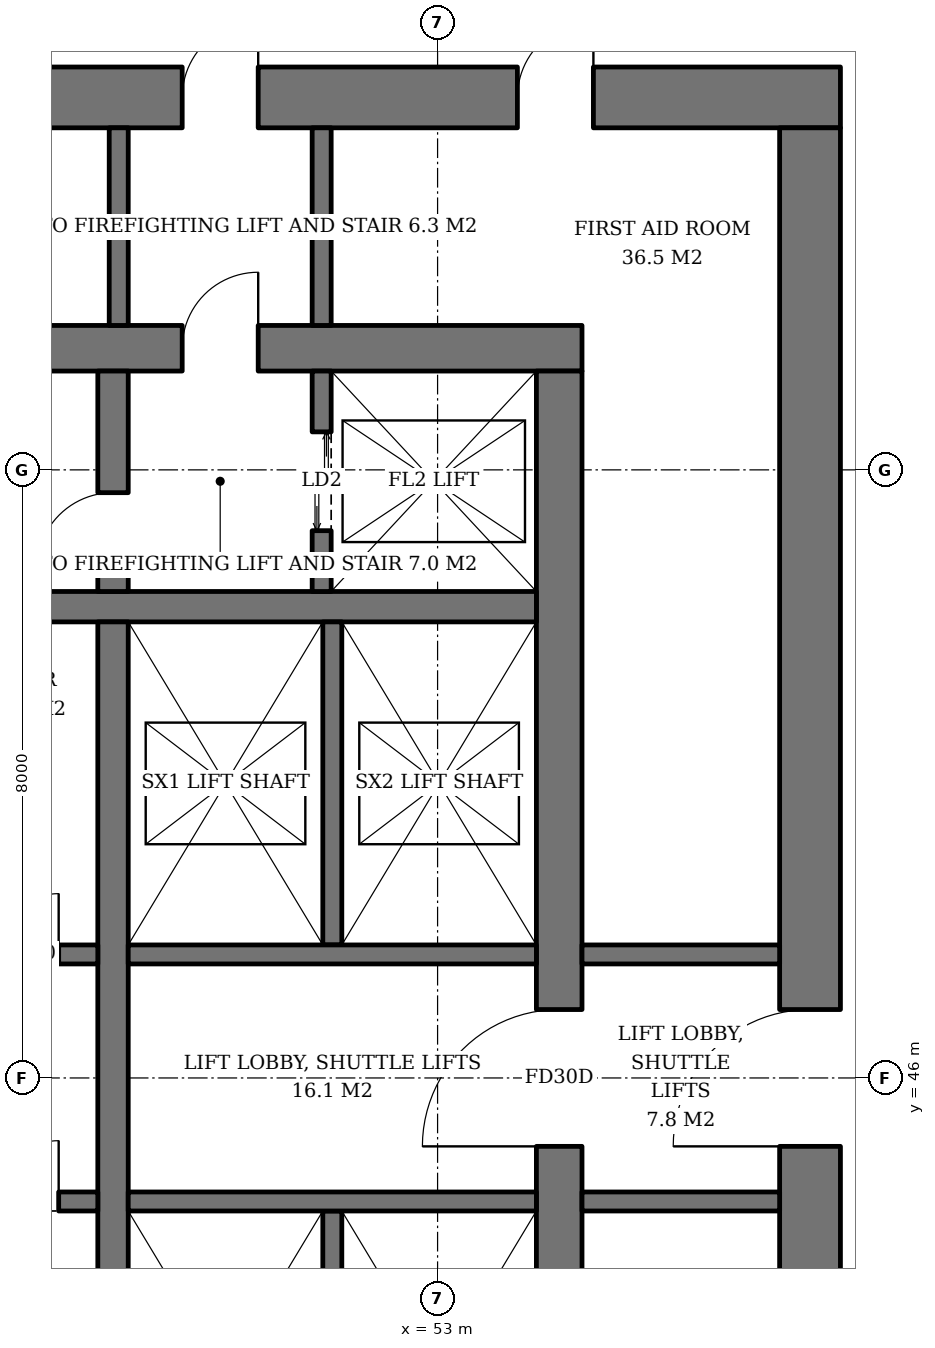
"""IFC4 building model, lengths in metres.
Left out: names, types, materials, properties, quantities, classifications, styles, units other than length and angle.
Written with IfcOpenShell. Run it as: python <this file> out.ifc"""

import sys

from ifc_helpers import new_model, si_unit, direction, frame, frame_2d, origin, place, context, subcontext, project, spatial, rectangle, extrude, element, fill, save


model = new_model("IFC4")
c1 = context("Model", 3, precision=1e-05, world=origin(), true_north=direction((0.0, 1.0)))
c2 = subcontext(c1, "Body", "Model", "MODEL_VIEW")
j1 = project(units=[si_unit("LENGTHUNIT", "METRE"), si_unit("PLANEANGLEUNIT", "RADIAN")], contexts=[c1])
p1 = place(None, origin())
s1 = spatial("IfcSite", under=j1, at=p1, CompositionType="ELEMENT")
p2 = place(p1, origin())
s2 = spatial("IfcBuilding", under=s1, at=p2, CompositionType="ELEMENT")
p3 = place(p2, frame((0.0, 0.0, 70.4)))
s3 = spatial("IfcBuildingStorey", under=s2, at=p3, CompositionType="ELEMENT", Elevation=70.4)
p4 = place(p3, frame((35.1, 55.6, 0.0), z_axis=(0.0, 0.0, 1.0), x_axis=(1.0, 0.0, 0.0)))
e1 = element("IfcWall", 1, at=p4, inside=s3, PredefinedType="SHEAR", context=c2, shape_type="SweptSolid", body=[
    extrude(rectangle(XDim=19.8, YDim=0.6, at=frame_2d((9.9, 0.0))), origin(), (0.0, 0.0, 1.0), 3.8),
])
p5 = place(p4, frame((14.54, 0.0, 0.0)))
e2 = element("IfcOpeningElement", 2, at=p5, cuts=e1, PredefinedType="OPENING", context=c2, shape_type="SweptSolid", body=[
    extrude(rectangle(XDim=1.0, YDim=2.1, at=frame_2d((0.5, 1.05))), frame((0.0, 0.31, 0.0), z_axis=(0.0, -1.0, 0.0), x_axis=(1.0, 0.0, 0.0)), (0.0, 0.0, 1.0), 0.62),
])
p6 = place(p4, frame((2.425, 0.0, 0.0)))
e3 = element("IfcOpeningElement", 3, at=p6, cuts=e1, PredefinedType="OPENING", context=c2, shape_type="SweptSolid", body=[
    extrude(rectangle(XDim=1.0, YDim=2.1, at=frame_2d((0.5, 1.05))), frame((0.0, 0.31, 0.0), z_axis=(0.0, -1.0, 0.0), x_axis=(1.0, 0.0, 0.0)), (0.0, 0.0, 1.0), 0.62),
])
p7 = place(p3, frame((54.6, 36.7, 0.0), z_axis=(0.0, 0.0, 1.0), x_axis=(0.0, 1.0, 0.0)))
e4 = element("IfcWall", 4, at=p7, inside=s3, PredefinedType="SHEAR", context=c2, shape_type="SweptSolid", body=[
    extrude(rectangle(XDim=18.6, YDim=0.6, at=frame_2d((9.3, 0.0))), origin(), (0.0, 0.0, 1.0), 3.8),
])
p8 = place(p7, frame((8.4, 0.0, 0.0)))
e5 = element("IfcOpeningElement", 5, at=p8, cuts=e4, PredefinedType="OPENING", context=c2, shape_type="SweptSolid", body=[
    extrude(rectangle(XDim=1.8, YDim=2.4, at=frame_2d((0.9, 1.2))), frame((0.0, 0.31, 0.0), z_axis=(0.0, -1.0, 0.0), x_axis=(1.0, 0.0, 0.0)), (0.0, 0.0, 1.0), 0.62),
])
p9 = place(p3, frame((31.7, 58.9, 0.0), z_axis=(0.0, 0.0, 1.0), x_axis=(1.0, 0.0, 0.0)))
e6 = element("IfcWall", 6, at=p9, inside=s3, PredefinedType="SHEAR", context=c2, shape_type="SweptSolid", body=[
    extrude(rectangle(XDim=26.6, YDim=0.8, at=frame_2d((13.3, 0.0))), origin(), (0.0, 0.0, 1.0), 3.8),
])
p10 = place(p9, frame((17.94, 0.0, 0.0)))
e7 = element("IfcOpeningElement", 7, at=p10, cuts=e6, PredefinedType="OPENING", context=c2, shape_type="SweptSolid", body=[
    extrude(rectangle(XDim=1.0, YDim=2.1, at=frame_2d((0.5, 1.05))), frame((0.0, 0.41, 0.0), z_axis=(0.0, -1.0, 0.0), x_axis=(1.0, 0.0, 0.0)), (0.0, 0.0, 1.0), 0.82),
])
p11 = place(p9, frame((5.825, 0.0, 0.0)))
e8 = element("IfcOpeningElement", 8, at=p11, cuts=e6, PredefinedType="OPENING", context=c2, shape_type="SweptSolid", body=[
    extrude(rectangle(XDim=1.0, YDim=2.1, at=frame_2d((0.5, 1.05))), frame((0.0, 0.41, 0.0), z_axis=(0.0, -1.0, 0.0), x_axis=(1.0, 0.0, 0.0)), (0.0, 0.0, 1.0), 0.82),
])
p12 = place(p9, frame((1.139, 0.0, 0.0)))
e9 = element("IfcOpeningElement", 9, at=p12, cuts=e6, PredefinedType="OPENING", context=c2, shape_type="SweptSolid", body=[
    extrude(rectangle(XDim=1.0, YDim=2.1, at=frame_2d((0.5, 1.05))), frame((0.0, 0.41, 0.0), z_axis=(0.0, -1.0, 0.0), x_axis=(1.0, 0.0, 0.0)), (0.0, 0.0, 1.0), 0.82),
])
p13 = place(p9, frame((2.661, 0.0, 0.0)))
e10 = element("IfcOpeningElement", 10, at=p13, cuts=e6, PredefinedType="OPENING", context=c2, shape_type="SweptSolid", body=[
    extrude(rectangle(XDim=1.0, YDim=2.1, at=frame_2d((0.5, 1.05))), frame((0.0, 0.41, 0.0), z_axis=(0.0, -1.0, 0.0), x_axis=(1.0, 0.0, 0.0)), (0.0, 0.0, 1.0), 0.82),
])
p14 = place(p9, frame((4.204, 0.0, 0.0)))
e11 = element("IfcOpeningElement", 11, at=p14, cuts=e6, PredefinedType="OPENING", context=c2, shape_type="SweptSolid", body=[
    extrude(rectangle(XDim=1.0, YDim=2.1, at=frame_2d((0.5, 1.05))), frame((0.0, 0.41, 0.0), z_axis=(0.0, -1.0, 0.0), x_axis=(1.0, 0.0, 0.0)), (0.0, 0.0, 1.0), 0.82),
])
p15 = place(p9, frame((8.44, 0.0, 0.0)))
e12 = element("IfcOpeningElement", 12, at=p15, cuts=e6, PredefinedType="OPENING", context=c2, shape_type="SweptSolid", body=[
    extrude(rectangle(XDim=1.0, YDim=2.1, at=frame_2d((0.5, 1.05))), frame((0.0, 0.41, 0.0), z_axis=(0.0, -1.0, 0.0), x_axis=(1.0, 0.0, 0.0)), (0.0, 0.0, 1.0), 0.82),
])
p16 = place(p9, frame((13.342, 0.0, 0.0)))
e13 = element("IfcOpeningElement", 13, at=p16, cuts=e6, PredefinedType="OPENING", context=c2, shape_type="SweptSolid", body=[
    extrude(rectangle(XDim=1.0, YDim=2.1, at=frame_2d((0.5, 1.05))), frame((0.0, 0.41, 0.0), z_axis=(0.0, -1.0, 0.0), x_axis=(1.0, 0.0, 0.0)), (0.0, 0.0, 1.0), 0.82),
])
p17 = place(p9, frame((22.35, 0.0, 0.0)))
e14 = element("IfcOpeningElement", 14, at=p17, cuts=e6, PredefinedType="OPENING", context=c2, shape_type="SweptSolid", body=[
    extrude(rectangle(XDim=1.0, YDim=2.1, at=frame_2d((0.5, 1.05))), frame((0.0, 0.41, 0.0), z_axis=(0.0, -1.0, 0.0), x_axis=(1.0, 0.0, 0.0)), (0.0, 0.0, 1.0), 0.82),
])
p18 = place(p3, frame((57.9, 33.5, 0.0), z_axis=(0.0, 0.0, 1.0), x_axis=(0.0, 1.0, 0.0)))
e15 = element("IfcWall", 15, at=p18, inside=s3, PredefinedType="SHEAR", context=c2, shape_type="SweptSolid", body=[
    extrude(rectangle(XDim=25.0, YDim=0.8, at=frame_2d((12.5, 0.0))), origin(), (0.0, 0.0, 1.0), 3.8),
])
p19 = place(p18, frame((11.6, 0.0, 0.0)))
e16 = element("IfcOpeningElement", 16, at=p19, cuts=e15, PredefinedType="OPENING", context=c2, shape_type="SweptSolid", body=[
    extrude(rectangle(XDim=1.8, YDim=2.4, at=frame_2d((0.9, 1.2))), frame((0.0, 0.41, 0.0), z_axis=(0.0, -1.0, 0.0), x_axis=(1.0, 0.0, 0.0)), (0.0, 0.0, 1.0), 0.82),
])
p20 = place(p3, frame((35.7, 52.2, 0.0), z_axis=(0.0, 0.0, 1.0), x_axis=(1.0, 0.0, 0.0)))
e17 = element("IfcWall", 17, at=p20, inside=s3, PredefinedType="SHEAR", context=c2, shape_type="SweptSolid", body=[
    extrude(rectangle(XDim=18.6, YDim=0.4, at=frame_2d((9.3, 0.0))), origin(), (0.0, 0.0, 1.0), 3.8),
])
p21 = place(p3, frame((48.73, 40.0, 0.0), z_axis=(0.0, 0.0, 1.0), x_axis=(0.0, 1.0, 0.0)))
e18 = element("IfcWall", 18, at=p21, inside=s3, PredefinedType="SHEAR", context=c2, shape_type="SweptSolid", body=[
    extrude(rectangle(XDim=12.0, YDim=0.4, at=frame_2d((6.0, 0.0))), origin(), (0.0, 0.0, 1.0), 3.8),
])
p22 = place(p3, frame((48.73, 52.4, 0.0), z_axis=(0.0, 0.0, 1.0), x_axis=(0.0, 1.0, 0.0)))
e19 = element("IfcWall", 19, at=p22, inside=s3, PredefinedType="SHEAR", context=c2, shape_type="SweptSolid", body=[
    extrude(rectangle(XDim=2.9, YDim=0.4, at=frame_2d((1.45, 0.0))), origin(), (0.0, 0.0, 1.0), 3.8),
])
p23 = place(p22, frame((0.3, 0.0, 0.0)))
e20 = element("IfcOpeningElement", 20, at=p23, cuts=e19, PredefinedType="OPENING", context=c2, shape_type="SweptSolid", body=[
    extrude(rectangle(XDim=1.0, YDim=2.1, at=frame_2d((0.5, 1.05))), frame((0.0, 0.21, 0.0), z_axis=(0.0, -1.0, 0.0), x_axis=(1.0, 0.0, 0.0)), (0.0, 0.0, 1.0), 0.42),
])
p24 = place(p3, frame((51.475, 52.4, 0.0), z_axis=(0.0, 0.0, 1.0), x_axis=(0.0, 1.0, 0.0)))
e21 = element("IfcWall", 21, at=p24, inside=s3, PredefinedType="SHEAR", context=c2, shape_type="SweptSolid", body=[
    extrude(rectangle(XDim=2.9, YDim=0.25, at=frame_2d((1.45, 0.0))), origin(), (0.0, 0.0, 1.0), 3.8),
])
p25 = place(p24, frame((0.8, 0.0, 0.0)))
e22 = element("IfcOpeningElement", 22, at=p25, cuts=e21, PredefinedType="OPENING", context=c2, shape_type="SweptSolid", body=[
    extrude(rectangle(XDim=1.3, YDim=2.2, at=frame_2d((0.65, 1.1))), frame((0.0, 0.135, 0.0), z_axis=(0.0, -1.0, 0.0), x_axis=(1.0, 0.0, 0.0)), (0.0, 0.0, 1.0), 0.27),
])
p26 = place(p3, frame((35.7, 47.625, 0.0), z_axis=(0.0, 0.0, 1.0), x_axis=(1.0, 0.0, 0.0)))
e23 = element("IfcWall", 23, at=p26, inside=s3, PredefinedType="SHEAR", context=c2, shape_type="SweptSolid", body=[
    extrude(rectangle(XDim=12.83, YDim=0.25, at=frame_2d((6.415, 0.0))), origin(), (0.0, 0.0, 1.0), 3.8),
])
p27 = place(p26, frame((0.7, 0.0, 0.0)))
e24 = element("IfcOpeningElement", 24, at=p27, cuts=e23, PredefinedType="OPENING", context=c2, shape_type="SweptSolid", body=[
    extrude(rectangle(XDim=1.1, YDim=2.2, at=frame_2d((0.55, 1.1))), frame((0.0, 0.135, 0.0), z_axis=(0.0, -1.0, 0.0), x_axis=(1.0, 0.0, 0.0)), (0.0, 0.0, 1.0), 0.27),
])
p28 = place(p26, frame((3.45, 0.0, 0.0)))
e25 = element("IfcOpeningElement", 25, at=p28, cuts=e23, PredefinedType="OPENING", context=c2, shape_type="SweptSolid", body=[
    extrude(rectangle(XDim=1.1, YDim=2.2, at=frame_2d((0.55, 1.1))), frame((0.0, 0.135, 0.0), z_axis=(0.0, -1.0, 0.0), x_axis=(1.0, 0.0, 0.0)), (0.0, 0.0, 1.0), 0.27),
])
p29 = place(p26, frame((6.2, 0.0, 0.0)))
e26 = element("IfcOpeningElement", 26, at=p29, cuts=e23, PredefinedType="OPENING", context=c2, shape_type="SweptSolid", body=[
    extrude(rectangle(XDim=1.1, YDim=2.2, at=frame_2d((0.55, 1.1))), frame((0.0, 0.135, 0.0), z_axis=(0.0, -1.0, 0.0), x_axis=(1.0, 0.0, 0.0)), (0.0, 0.0, 1.0), 0.27),
])
p30 = place(p26, frame((8.95, 0.0, 0.0)))
e27 = element("IfcOpeningElement", 27, at=p30, cuts=e23, PredefinedType="OPENING", context=c2, shape_type="SweptSolid", body=[
    extrude(rectangle(XDim=1.1, YDim=2.2, at=frame_2d((0.55, 1.1))), frame((0.0, 0.135, 0.0), z_axis=(0.0, -1.0, 0.0), x_axis=(1.0, 0.0, 0.0)), (0.0, 0.0, 1.0), 0.27),
])
p31 = place(p26, frame((11.515, 0.0, 0.0)))
e28 = element("IfcOpeningElement", 28, at=p31, cuts=e23, PredefinedType="OPENING", context=c2, shape_type="SweptSolid", body=[
    extrude(rectangle(XDim=0.8, YDim=2.0, at=frame_2d((0.4, 1.0))), frame((0.0, 0.135, 0.0), z_axis=(0.0, -1.0, 0.0), x_axis=(1.0, 0.0, 0.0)), (0.0, 0.0, 1.0), 0.27),
])
p32 = place(p3, frame((35.7, 44.375, 0.0), z_axis=(0.0, 0.0, 1.0), x_axis=(1.0, 0.0, 0.0)))
e29 = element("IfcWall", 29, at=p32, inside=s3, PredefinedType="SHEAR", context=c2, shape_type="SweptSolid", body=[
    extrude(rectangle(XDim=12.83, YDim=0.25, at=frame_2d((6.415, 0.0))), origin(), (0.0, 0.0, 1.0), 3.8),
])
p33 = place(p32, frame((0.7, 0.0, 0.0)))
e30 = element("IfcOpeningElement", 30, at=p33, cuts=e29, PredefinedType="OPENING", context=c2, shape_type="SweptSolid", body=[
    extrude(rectangle(XDim=1.1, YDim=2.2, at=frame_2d((0.55, 1.1))), frame((0.0, 0.135, 0.0), z_axis=(0.0, -1.0, 0.0), x_axis=(1.0, 0.0, 0.0)), (0.0, 0.0, 1.0), 0.27),
])
p34 = place(p32, frame((3.45, 0.0, 0.0)))
e31 = element("IfcOpeningElement", 31, at=p34, cuts=e29, PredefinedType="OPENING", context=c2, shape_type="SweptSolid", body=[
    extrude(rectangle(XDim=1.1, YDim=2.2, at=frame_2d((0.55, 1.1))), frame((0.0, 0.135, 0.0), z_axis=(0.0, -1.0, 0.0), x_axis=(1.0, 0.0, 0.0)), (0.0, 0.0, 1.0), 0.27),
])
p35 = place(p32, frame((6.2, 0.0, 0.0)))
e32 = element("IfcOpeningElement", 32, at=p35, cuts=e29, PredefinedType="OPENING", context=c2, shape_type="SweptSolid", body=[
    extrude(rectangle(XDim=1.1, YDim=2.2, at=frame_2d((0.55, 1.1))), frame((0.0, 0.135, 0.0), z_axis=(0.0, -1.0, 0.0), x_axis=(1.0, 0.0, 0.0)), (0.0, 0.0, 1.0), 0.27),
])
p36 = place(p32, frame((8.95, 0.0, 0.0)))
e33 = element("IfcOpeningElement", 33, at=p36, cuts=e29, PredefinedType="OPENING", context=c2, shape_type="SweptSolid", body=[
    extrude(rectangle(XDim=1.1, YDim=2.2, at=frame_2d((0.55, 1.1))), frame((0.0, 0.135, 0.0), z_axis=(0.0, -1.0, 0.0), x_axis=(1.0, 0.0, 0.0)), (0.0, 0.0, 1.0), 0.27),
])
p37 = place(p32, frame((11.515, 0.0, 0.0)))
e34 = element("IfcOpeningElement", 34, at=p37, cuts=e29, PredefinedType="OPENING", context=c2, shape_type="SweptSolid", body=[
    extrude(rectangle(XDim=0.8, YDim=2.0, at=frame_2d((0.4, 1.0))), frame((0.0, 0.135, 0.0), z_axis=(0.0, -1.0, 0.0), x_axis=(1.0, 0.0, 0.0)), (0.0, 0.0, 1.0), 0.27),
])
p38 = place(p3, frame((51.615, 47.75, 0.0), z_axis=(0.0, 0.0, 1.0), x_axis=(0.0, 1.0, 0.0)))
e35 = element("IfcWall", 35, at=p38, inside=s3, PredefinedType="SHEAR", context=c2, shape_type="SweptSolid", body=[
    extrude(rectangle(XDim=4.25, YDim=0.25, at=frame_2d((2.125, 0.0))), origin(), (0.0, 0.0, 1.0), 3.8),
])
p39 = place(p3, frame((48.93, 47.625, 0.0), z_axis=(0.0, 0.0, 1.0), x_axis=(1.0, 0.0, 0.0)))
e36 = element("IfcWall", 36, at=p39, inside=s3, PredefinedType="SHEAR", context=c2, shape_type="SweptSolid", body=[
    extrude(rectangle(XDim=5.37, YDim=0.25, at=frame_2d((2.685, 0.0))), origin(), (0.0, 0.0, 1.0), 3.8),
])
p40 = place(p3, frame((51.615, 44.25, 0.0), z_axis=(0.0, 0.0, 1.0), x_axis=(0.0, -1.0, 0.0)))
e37 = element("IfcWall", 37, at=p40, inside=s3, PredefinedType="SHEAR", context=c2, shape_type="SweptSolid", body=[
    extrude(rectangle(XDim=4.25, YDim=0.25, at=frame_2d((2.125, 0.0))), origin(), (0.0, 0.0, 1.0), 3.8),
])
p41 = place(p3, frame((48.93, 44.375, 0.0), z_axis=(0.0, 0.0, 1.0), x_axis=(1.0, 0.0, 0.0)))
e38 = element("IfcWall", 38, at=p41, inside=s3, PredefinedType="SHEAR", context=c2, shape_type="SweptSolid", body=[
    extrude(rectangle(XDim=5.37, YDim=0.25, at=frame_2d((2.685, 0.0))), origin(), (0.0, 0.0, 1.0), 3.8),
])
for number, where, z_axis, x_axis in (
    (39, (48.805, 55.9, 0.0), (0.0, 0.0, 1.0), (0.0, 1.0, 0.0)),
    (40, (51.475, 55.9, 0.0), (0.0, 0.0, 1.0), (0.0, 1.0, 0.0)),
    (41, (54.9, 44.375, 0.0), (0.0, 0.0, 1.0), (1.0, 0.0, 0.0)),
    (42, (54.9, 47.625, 0.0), (0.0, 0.0, 1.0), (1.0, 0.0, 0.0)),
):
    element("IfcWall", number, at=place(p3, frame(where, z_axis=z_axis, x_axis=x_axis)), inside=s3, PredefinedType="SOLIDWALL", context=c2, shape_type="SweptSolid", body=[
        extrude(rectangle(XDim=2.6, YDim=0.25, at=frame_2d((1.3, 0.0))), origin(), (0.0, 0.0, 1.0), 3.62),
    ])
p42 = place(p25, origin())
e43 = element("IfcDoor", 43, at=p42, inside=s3, OperationType="DOUBLE_DOOR_SLIDING", PredefinedType="DOOR", context=c2, shape_type="SweptSolid", body=[
    extrude(rectangle(XDim=1.3, YDim=2.2, at=frame_2d((0.65, 1.1))), frame((0.0, 0.025, 0.0), z_axis=(0.0, -1.0, 0.0), x_axis=(1.0, 0.0, 0.0)), (0.0, 0.0, 1.0), 0.05),
])
fill(e22, e43)
p43 = place(p31, origin())
e44 = element("IfcDoor", 44, at=p43, inside=s3, OperationType="SINGLE_SWING_RIGHT", PredefinedType="DOOR", context=c2, shape_type="SweptSolid", body=[
    extrude(rectangle(XDim=0.8, YDim=2.0, at=frame_2d((0.4, 1.0))), frame((0.0, 0.025, 0.0), z_axis=(0.0, -1.0, 0.0), x_axis=(1.0, 0.0, 0.0)), (0.0, 0.0, 1.0), 0.05),
])
fill(e28, e44)
p44 = place(p37, origin())
e45 = element("IfcDoor", 45, at=p44, inside=s3, OperationType="SINGLE_SWING_RIGHT", PredefinedType="DOOR", context=c2, shape_type="SweptSolid", body=[
    extrude(rectangle(XDim=0.8, YDim=2.0, at=frame_2d((0.4, 1.0))), frame((0.0, 0.025, 0.0), z_axis=(0.0, -1.0, 0.0), x_axis=(1.0, 0.0, 0.0)), (0.0, 0.0, 1.0), 0.05),
])
fill(e34, e45)
p45 = place(p23, origin())
e46 = element("IfcDoor", 46, at=p45, inside=s3, OperationType="SINGLE_SWING_LEFT", PredefinedType="DOOR", context=c2, shape_type="SweptSolid", body=[
    extrude(rectangle(XDim=1.0, YDim=2.1, at=frame_2d((0.5, 1.05))), frame((0.0, 0.025, 0.0), z_axis=(0.0, -1.0, 0.0), x_axis=(1.0, 0.0, 0.0)), (0.0, 0.0, 1.0), 0.05),
])
fill(e20, e46)
p46 = place(p5, origin())
e47 = element("IfcDoor", 47, at=p46, inside=s3, OperationType="SINGLE_SWING_RIGHT", PredefinedType="DOOR", context=c2, shape_type="SweptSolid", body=[
    extrude(rectangle(XDim=1.0, YDim=2.1, at=frame_2d((0.5, 1.05))), frame((0.0, 0.025, 0.0), z_axis=(0.0, -1.0, 0.0), x_axis=(1.0, 0.0, 0.0)), (0.0, 0.0, 1.0), 0.05),
])
fill(e2, e47)
p47 = place(p8, origin())
e48 = element("IfcDoor", 48, at=p47, inside=s3, OperationType="DOUBLE_DOOR_SINGLE_SWING", PredefinedType="DOOR", context=c2, shape_type="SweptSolid", body=[
    extrude(rectangle(XDim=1.8, YDim=2.4, at=frame_2d((0.9, 1.2))), frame((0.0, 0.025, 0.0), z_axis=(0.0, -1.0, 0.0), x_axis=(1.0, 0.0, 0.0)), (0.0, 0.0, 1.0), 0.05),
])
fill(e5, e48)
p48 = place(p19, origin())
e49 = element("IfcDoor", 49, at=p48, inside=s3, OperationType="DOUBLE_DOOR_SINGLE_SWING", PredefinedType="DOOR", context=c2, shape_type="SweptSolid", body=[
    extrude(rectangle(XDim=1.8, YDim=2.4, at=frame_2d((0.9, 1.2))), frame((0.0, 0.025, 0.0), z_axis=(0.0, -1.0, 0.0), x_axis=(1.0, 0.0, 0.0)), (0.0, 0.0, 1.0), 0.05),
])
fill(e16, e49)
p49 = place(p10, origin())
e50 = element("IfcDoor", 50, at=p49, inside=s3, OperationType="SINGLE_SWING_RIGHT", PredefinedType="DOOR", context=c2, shape_type="SweptSolid", body=[
    extrude(rectangle(XDim=1.0, YDim=2.1, at=frame_2d((0.5, 1.05))), frame((0.0, 0.025, 0.0), z_axis=(0.0, -1.0, 0.0), x_axis=(1.0, 0.0, 0.0)), (0.0, 0.0, 1.0), 0.05),
])
fill(e7, e50)
p50 = place(p17, origin())
e51 = element("IfcDoor", 51, at=p50, inside=s3, OperationType="SINGLE_SWING_RIGHT", PredefinedType="DOOR", context=c2, shape_type="SweptSolid", body=[
    extrude(rectangle(XDim=1.0, YDim=2.1, at=frame_2d((0.5, 1.05))), frame((0.0, -0.34, 0.0), z_axis=(0.0, -1.0, 0.0), x_axis=(1.0, 0.0, 0.0)), (0.0, 0.0, 1.0), 0.05),
])
fill(e14, e51)
save(model, sys.argv[1])
